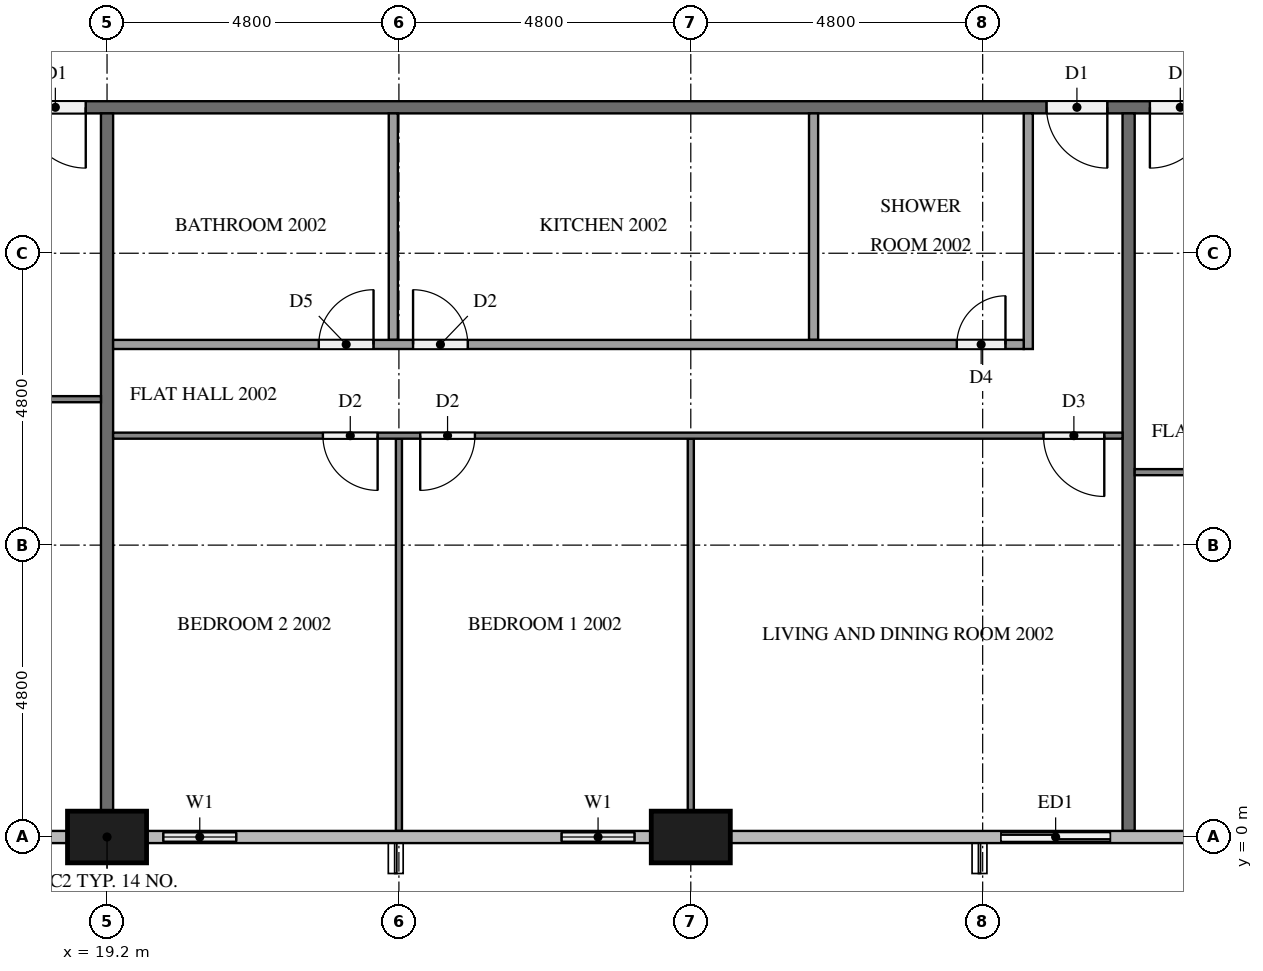
"""IFC4 building model, lengths in metres.
Left out: names, types, materials, properties, quantities, classifications, styles, units other than length and angle.
Written with IfcOpenShell. Run it as: python <this file> out.ifc"""

import sys

from ifc_helpers import new_model, si_unit, direction, frame, frame_2d, origin, origin_2d, place, context, subcontext, project, spatial, rectangle, extrude, element, fill, save


model = new_model("IFC4")
c1 = context("Model", 3, precision=1e-05, world=origin(), true_north=direction((0.0, 1.0)))
c2 = subcontext(c1, "Body", "Model", "MODEL_VIEW")
j1 = project(units=[si_unit("LENGTHUNIT", "METRE"), si_unit("PLANEANGLEUNIT", "RADIAN")], contexts=[c1])
p1 = place(None, origin())
s1 = spatial("IfcSite", under=j1, at=p1, CompositionType="ELEMENT")
p2 = place(p1, origin())
s2 = spatial("IfcBuilding", under=s1, at=p2, CompositionType="ELEMENT")
p3 = place(p2, frame((0.0, 0.0, 80.3)))
s3 = spatial("IfcBuildingStorey", under=s2, at=p3, CompositionType="ELEMENT", Elevation=80.3)
for number, where, z_axis, x_axis in (
    (1, (19.2, 0.0, 0.0), (0.0, 0.0, 1.0), (1.0, 0.0, 0.0)),
    (2, (28.8, 0.0, 0.0), (0.0, 0.0, 1.0), (1.0, 0.0, 0.0)),
):
    element("IfcColumn", number, at=place(p3, frame(where, z_axis=z_axis, x_axis=x_axis)), inside=s3, PredefinedType="COLUMN", context=c2, shape_type="SweptSolid", body=[
        extrude(rectangle(XDim=1.3, YDim=0.85, at=origin_2d()), origin(), (0.0, 0.0, 1.0), 3.1),
    ])
p4 = place(p3, frame((16.8, 0.0, 0.0), z_axis=(0.0, 0.0, 1.0), x_axis=(1.0, 0.0, 0.0)))
e3 = element("IfcWall", 3, at=p4, inside=s3, PredefinedType="SOLIDWALL", context=c2, shape_type="SweptSolid", body=[
    extrude(rectangle(XDim=1.75, YDim=0.15, at=frame_2d((0.875, 0.0))), origin(), (0.0, 0.0, 1.0), 3.1),
])
p5 = place(p4, frame((0.275, 0.0, 0.9)))
e4 = element("IfcOpeningElement", 4, at=p5, cuts=e3, PredefinedType="OPENING", context=c2, shape_type="SweptSolid", body=[
    extrude(rectangle(XDim=1.2, YDim=1.4, at=frame_2d((0.6, 0.7))), frame((0.0, 0.085, 0.0), z_axis=(0.0, -1.0, 0.0), x_axis=(1.0, 0.0, 0.0)), (0.0, 0.0, 1.0), 0.17),
])
p6 = place(p3, frame((19.85, 0.0, 0.0), z_axis=(0.0, 0.0, 1.0), x_axis=(1.0, 0.0, 0.0)))
e5 = element("IfcWall", 5, at=p6, inside=s3, PredefinedType="SOLIDWALL", context=c2, shape_type="SweptSolid", body=[
    extrude(rectangle(XDim=1.75, YDim=0.15, at=frame_2d((0.875, 0.0))), origin(), (0.0, 0.0, 1.0), 3.1),
])
p7 = place(p6, frame((0.275, 0.0, 0.9)))
e6 = element("IfcOpeningElement", 6, at=p7, cuts=e5, PredefinedType="OPENING", context=c2, shape_type="SweptSolid", body=[
    extrude(rectangle(XDim=1.2, YDim=1.4, at=frame_2d((0.6, 0.7))), frame((0.0, 0.085, 0.0), z_axis=(0.0, -1.0, 0.0), x_axis=(1.0, 0.0, 0.0)), (0.0, 0.0, 1.0), 0.17),
])
p8 = place(p3, frame((26.4, 0.0, 0.0), z_axis=(0.0, 0.0, 1.0), x_axis=(1.0, 0.0, 0.0)))
e7 = element("IfcWall", 7, at=p8, inside=s3, PredefinedType="SOLIDWALL", context=c2, shape_type="SweptSolid", body=[
    extrude(rectangle(XDim=1.75, YDim=0.15, at=frame_2d((0.875, 0.0))), origin(), (0.0, 0.0, 1.0), 3.1),
])
p9 = place(p8, frame((0.275, 0.0, 0.9)))
e8 = element("IfcOpeningElement", 8, at=p9, cuts=e7, PredefinedType="OPENING", context=c2, shape_type="SweptSolid", body=[
    extrude(rectangle(XDim=1.2, YDim=1.4, at=frame_2d((0.6, 0.7))), frame((0.0, 0.085, 0.0), z_axis=(0.0, -1.0, 0.0), x_axis=(1.0, 0.0, 0.0)), (0.0, 0.0, 1.0), 0.17),
])
p10 = place(p3, frame((33.6, 0.0, 0.0), z_axis=(0.0, 0.0, 1.0), x_axis=(1.0, 0.0, 0.0)))
e9 = element("IfcWall", 9, at=p10, inside=s3, PredefinedType="SOLIDWALL", context=c2, shape_type="SweptSolid", body=[
    extrude(rectangle(XDim=2.4, YDim=0.15, at=frame_2d((1.2, 0.0))), origin(), (0.0, 0.0, 1.0), 3.1),
])
p11 = place(p10, frame((0.3, 0.0, 0.0)))
e10 = element("IfcOpeningElement", 10, at=p11, cuts=e9, PredefinedType="OPENING", context=c2, shape_type="SweptSolid", body=[
    extrude(rectangle(XDim=1.8, YDim=2.4, at=frame_2d((0.9, 1.2))), frame((0.0, 0.085, 0.0), z_axis=(0.0, -1.0, 0.0), x_axis=(1.0, 0.0, 0.0)), (0.0, 0.0, 1.0), 0.17),
])
p12 = place(p3, frame((50.5, 12.0, 0.0), z_axis=(0.0, 0.0, 1.0), x_axis=(-1.0, 0.0, 0.0)))
e11 = element("IfcWall", 11, at=p12, inside=s3, PredefinedType="PARTITIONING", context=c2, shape_type="SweptSolid", body=[
    extrude(rectangle(XDim=38.6, YDim=0.2, at=frame_2d((19.3, 0.0))), origin(), (0.0, 0.0, 1.0), 3.1),
])
p13 = place(p12, frame((31.65, 0.0, 0.0)))
e12 = element("IfcOpeningElement", 12, at=p13, cuts=e11, PredefinedType="OPENING", context=c2, shape_type="SweptSolid", body=[
    extrude(rectangle(XDim=1.0, YDim=2.1, at=frame_2d((0.5, 1.05))), frame((0.0, 0.11, 0.0), z_axis=(0.0, -1.0, 0.0), x_axis=(1.0, 0.0, 0.0)), (0.0, 0.0, 1.0), 0.22),
])
p14 = place(p12, frame((14.85, 0.0, 0.0)))
e13 = element("IfcOpeningElement", 13, at=p14, cuts=e11, PredefinedType="OPENING", context=c2, shape_type="SweptSolid", body=[
    extrude(rectangle(XDim=1.0, YDim=2.1, at=frame_2d((0.5, 1.05))), frame((0.0, 0.11, 0.0), z_axis=(0.0, -1.0, 0.0), x_axis=(1.0, 0.0, 0.0)), (0.0, 0.0, 1.0), 0.22),
])
p15 = place(p12, frame((13.15, 0.0, 0.0)))
e14 = element("IfcOpeningElement", 14, at=p15, cuts=e11, PredefinedType="OPENING", context=c2, shape_type="SweptSolid", body=[
    extrude(rectangle(XDim=1.0, YDim=2.1, at=frame_2d((0.5, 1.05))), frame((0.0, 0.11, 0.0), z_axis=(0.0, -1.0, 0.0), x_axis=(1.0, 0.0, 0.0)), (0.0, 0.0, 1.0), 0.22),
])
p16 = place(p3, frame((19.2, 11.9, 0.0), z_axis=(0.0, 0.0, 1.0), x_axis=(0.0, -1.0, 0.0)))
e15 = element("IfcWall", 15, at=p16, inside=s3, PredefinedType="PARTITIONING", context=c2, shape_type="SweptSolid", body=[
    extrude(rectangle(XDim=11.475, YDim=0.2, at=frame_2d((5.737, 0.0))), origin(), (0.0, 0.0, 1.0), 3.1),
])
p17 = place(p3, frame((36.0, 11.9, 0.0), z_axis=(0.0, 0.0, 1.0), x_axis=(0.0, -1.0, 0.0)))
e16 = element("IfcWall", 16, at=p17, inside=s3, PredefinedType="PARTITIONING", context=c2, shape_type="SweptSolid", body=[
    extrude(rectangle(XDim=11.8, YDim=0.2, at=frame_2d((5.9, 0.0))), origin(), (0.0, 0.0, 1.0), 3.1),
])
p18 = place(p3, frame((19.1, 7.2, 0.0), z_axis=(0.0, 0.0, 1.0), x_axis=(-1.0, 0.0, 0.0)))
e17 = element("IfcWall", 17, at=p18, inside=s3, PredefinedType="PARTITIONING", context=c2, shape_type="SweptSolid", body=[
    extrude(rectangle(XDim=14.2, YDim=0.1, at=frame_2d((7.1, 0.0))), origin(), (0.0, 0.0, 1.0), 3.1),
])
p19 = place(p18, frame((3.45, 0.0, 0.0)))
e18 = element("IfcOpeningElement", 18, at=p19, cuts=e17, PredefinedType="OPENING", context=c2, shape_type="SweptSolid", body=[
    extrude(rectangle(XDim=0.9, YDim=2.1, at=frame_2d((0.45, 1.05))), frame((0.0, 0.06, 0.0), z_axis=(0.0, -1.0, 0.0), x_axis=(1.0, 0.0, 0.0)), (0.0, 0.0, 1.0), 0.12),
])
p20 = place(p18, frame((5.05, 0.0, 0.0)))
e19 = element("IfcOpeningElement", 19, at=p20, cuts=e17, PredefinedType="OPENING", context=c2, shape_type="SweptSolid", body=[
    extrude(rectangle(XDim=0.9, YDim=2.1, at=frame_2d((0.45, 1.05))), frame((0.0, 0.06, 0.0), z_axis=(0.0, -1.0, 0.0), x_axis=(1.0, 0.0, 0.0)), (0.0, 0.0, 1.0), 0.12),
])
p21 = place(p18, frame((12.9, 0.0, 0.0)))
e20 = element("IfcOpeningElement", 20, at=p21, cuts=e17, PredefinedType="OPENING", context=c2, shape_type="SweptSolid", body=[
    extrude(rectangle(XDim=1.0, YDim=2.1, at=frame_2d((0.5, 1.05))), frame((0.0, 0.06, 0.0), z_axis=(0.0, -1.0, 0.0), x_axis=(1.0, 0.0, 0.0)), (0.0, 0.0, 1.0), 0.12),
])
p22 = place(p3, frame((28.8, 6.55, 0.0), z_axis=(0.0, 0.0, 1.0), x_axis=(0.0, -1.0, 0.0)))
e21 = element("IfcWall", 21, at=p22, inside=s3, PredefinedType="PARTITIONING", context=c2, shape_type="SweptSolid", body=[
    extrude(rectangle(XDim=6.125, YDim=0.1, at=frame_2d((3.062, 0.0))), origin(), (0.0, 0.0, 1.0), 3.1),
])
p23 = place(p3, frame((24.0, 6.55, 0.0), z_axis=(0.0, 0.0, 1.0), x_axis=(0.0, -1.0, 0.0)))
e22 = element("IfcWall", 22, at=p23, inside=s3, PredefinedType="PARTITIONING", context=c2, shape_type="SweptSolid", body=[
    extrude(rectangle(XDim=6.45, YDim=0.1, at=frame_2d((3.225, 0.0))), origin(), (0.0, 0.0, 1.0), 3.1),
])
p24 = place(p3, frame((35.9, 6.6, 0.0), z_axis=(0.0, 0.0, 1.0), x_axis=(-1.0, 0.0, 0.0)))
e23 = element("IfcWall", 23, at=p24, inside=s3, PredefinedType="PARTITIONING", context=c2, shape_type="SweptSolid", body=[
    extrude(rectangle(XDim=16.6, YDim=0.1, at=frame_2d((8.3, 0.0))), origin(), (0.0, 0.0, 1.0), 3.1),
])
p25 = place(p24, frame((0.3, 0.0, 0.0)))
e24 = element("IfcOpeningElement", 24, at=p25, cuts=e23, PredefinedType="OPENING", context=c2, shape_type="SweptSolid", body=[
    extrude(rectangle(XDim=1.0, YDim=2.1, at=frame_2d((0.5, 1.05))), frame((0.0, 0.06, 0.0), z_axis=(0.0, -1.0, 0.0), x_axis=(1.0, 0.0, 0.0)), (0.0, 0.0, 1.0), 0.12),
])
p26 = place(p24, frame((10.65, 0.0, 0.0)))
e25 = element("IfcOpeningElement", 25, at=p26, cuts=e23, PredefinedType="OPENING", context=c2, shape_type="SweptSolid", body=[
    extrude(rectangle(XDim=0.9, YDim=2.1, at=frame_2d((0.45, 1.05))), frame((0.0, 0.06, 0.0), z_axis=(0.0, -1.0, 0.0), x_axis=(1.0, 0.0, 0.0)), (0.0, 0.0, 1.0), 0.12),
])
p27 = place(p24, frame((12.25, 0.0, 0.0)))
e26 = element("IfcOpeningElement", 26, at=p27, cuts=e23, PredefinedType="OPENING", context=c2, shape_type="SweptSolid", body=[
    extrude(rectangle(XDim=0.9, YDim=2.1, at=frame_2d((0.45, 1.05))), frame((0.0, 0.06, 0.0), z_axis=(0.0, -1.0, 0.0), x_axis=(1.0, 0.0, 0.0)), (0.0, 0.0, 1.0), 0.12),
])
for number, where, z_axis, x_axis in (
    (27, (30.819, 11.9, 0.0), (0.0, 0.0, 1.0), (0.0, -1.0, 0.0)),
    (28, (23.908, 11.9, 0.0), (0.0, 0.0, 1.0), (0.0, -1.0, 0.0)),
):
    element("IfcWall", number, at=place(p3, frame(where, z_axis=z_axis, x_axis=x_axis)), inside=s3, PredefinedType="PARTITIONING", context=c2, shape_type="SweptSolid", body=[
        extrude(rectangle(XDim=3.725, YDim=0.15, at=frame_2d((1.862, 0.0))), origin(), (0.0, 0.0, 1.0), 3.1),
    ])
p28 = place(p3, frame((34.35, 11.9, 0.0), z_axis=(0.0, 0.0, 1.0), x_axis=(0.0, -1.0, 0.0)))
e29 = element("IfcWall", 29, at=p28, inside=s3, PredefinedType="PARTITIONING", context=c2, shape_type="SweptSolid", body=[
    extrude(rectangle(XDim=3.875, YDim=0.15, at=frame_2d((1.938, 0.0))), origin(), (0.0, 0.0, 1.0), 3.1),
])
p29 = place(p3, frame((19.3, 8.1, 0.0), z_axis=(0.0, 0.0, 1.0), x_axis=(1.0, 0.0, 0.0)))
e30 = element("IfcWall", 30, at=p29, inside=s3, PredefinedType="PARTITIONING", context=c2, shape_type="SweptSolid", body=[
    extrude(rectangle(XDim=14.975, YDim=0.15, at=frame_2d((7.487, 0.0))), origin(), (0.0, 0.0, 1.0), 3.1),
])
p30 = place(p29, frame((13.875, 0.0, 0.0)))
e31 = element("IfcOpeningElement", 31, at=p30, cuts=e30, PredefinedType="OPENING", context=c2, shape_type="SweptSolid", body=[
    extrude(rectangle(XDim=0.8, YDim=2.1, at=frame_2d((0.4, 1.05))), frame((0.0, 0.085, 0.0), z_axis=(0.0, -1.0, 0.0), x_axis=(1.0, 0.0, 0.0)), (0.0, 0.0, 1.0), 0.17),
])
p31 = place(p29, frame((4.933, 0.0, 0.0)))
e32 = element("IfcOpeningElement", 32, at=p31, cuts=e30, PredefinedType="OPENING", context=c2, shape_type="SweptSolid", body=[
    extrude(rectangle(XDim=0.9, YDim=2.1, at=frame_2d((0.45, 1.05))), frame((0.0, 0.085, 0.0), z_axis=(0.0, -1.0, 0.0), x_axis=(1.0, 0.0, 0.0)), (0.0, 0.0, 1.0), 0.17),
])
p32 = place(p29, frame((3.383, 0.0, 0.0)))
e33 = element("IfcOpeningElement", 33, at=p32, cuts=e30, PredefinedType="OPENING", context=c2, shape_type="SweptSolid", body=[
    extrude(rectangle(XDim=0.9, YDim=2.1, at=frame_2d((0.45, 1.05))), frame((0.0, 0.085, 0.0), z_axis=(0.0, -1.0, 0.0), x_axis=(1.0, 0.0, 0.0)), (0.0, 0.0, 1.0), 0.17),
])
p33 = place(p3, frame((50.3, 6.0, 0.0), z_axis=(0.0, 0.0, 1.0), x_axis=(-1.0, 0.0, 0.0)))
e34 = element("IfcWall", 34, at=p33, inside=s3, PredefinedType="PARTITIONING", context=c2, shape_type="SweptSolid", body=[
    extrude(rectangle(XDim=14.2, YDim=0.1, at=frame_2d((7.1, 0.0))), origin(), (0.0, 0.0, 1.0), 3.1),
])
p34 = place(p33, frame((9.85, 0.0, 0.0)))
e35 = element("IfcOpeningElement", 35, at=p34, cuts=e34, PredefinedType="OPENING", context=c2, shape_type="SweptSolid", body=[
    extrude(rectangle(XDim=1.0, YDim=2.1, at=frame_2d((0.5, 1.05))), frame((0.0, 0.06, 0.0), z_axis=(0.0, -1.0, 0.0), x_axis=(1.0, 0.0, 0.0)), (0.0, 0.0, 1.0), 0.12),
])
p35 = place(p33, frame((8.25, 0.0, 0.0)))
e36 = element("IfcOpeningElement", 36, at=p35, cuts=e34, PredefinedType="OPENING", context=c2, shape_type="SweptSolid", body=[
    extrude(rectangle(XDim=0.9, YDim=2.1, at=frame_2d((0.45, 1.05))), frame((0.0, 0.06, 0.0), z_axis=(0.0, -1.0, 0.0), x_axis=(1.0, 0.0, 0.0)), (0.0, 0.0, 1.0), 0.12),
])
p36 = place(p33, frame((0.3, 0.0, 0.0)))
e37 = element("IfcOpeningElement", 37, at=p36, cuts=e34, PredefinedType="OPENING", context=c2, shape_type="SweptSolid", body=[
    extrude(rectangle(XDim=0.9, YDim=2.1, at=frame_2d((0.45, 1.05))), frame((0.0, 0.06, 0.0), z_axis=(0.0, -1.0, 0.0), x_axis=(1.0, 0.0, 0.0)), (0.0, 0.0, 1.0), 0.12),
])
p37 = place(p7, origin())
e38 = element("IfcWindow", 38, at=p37, inside=s3, PartitioningType="SINGLE_PANEL", PredefinedType="WINDOW", context=c2, shape_type="SweptSolid", body=[
    extrude(rectangle(XDim=1.2, YDim=1.4, at=frame_2d((0.6, 0.7))), frame((0.0, 0.03, 0.0), z_axis=(0.0, -1.0, 0.0), x_axis=(1.0, 0.0, 0.0)), (0.0, 0.0, 1.0), 0.06),
])
fill(e6, e38)
p38 = place(p9, origin())
e39 = element("IfcWindow", 39, at=p38, inside=s3, PartitioningType="SINGLE_PANEL", PredefinedType="WINDOW", context=c2, shape_type="SweptSolid", body=[
    extrude(rectangle(XDim=1.2, YDim=1.4, at=frame_2d((0.6, 0.7))), frame((0.0, 0.03, 0.0), z_axis=(0.0, -1.0, 0.0), x_axis=(1.0, 0.0, 0.0)), (0.0, 0.0, 1.0), 0.06),
])
fill(e8, e39)
p39 = place(p11, origin())
e40 = element("IfcDoor", 40, at=p39, inside=s3, OperationType="SLIDING_TO_LEFT", PredefinedType="DOOR", context=c2, shape_type="SweptSolid", body=[
    extrude(rectangle(XDim=1.8, YDim=2.4, at=frame_2d((0.9, 1.2))), frame((0.0, 0.025, 0.0), z_axis=(0.0, -1.0, 0.0), x_axis=(1.0, 0.0, 0.0)), (0.0, 0.0, 1.0), 0.05),
])
fill(e10, e40)
p40 = place(p13, origin())
e41 = element("IfcDoor", 41, at=p40, inside=s3, OperationType="SINGLE_SWING_LEFT", PredefinedType="DOOR", context=c2, shape_type="SweptSolid", body=[
    extrude(rectangle(XDim=1.0, YDim=2.1, at=frame_2d((0.5, 1.05))), frame((0.0, 0.025, 0.0), z_axis=(0.0, -1.0, 0.0), x_axis=(1.0, 0.0, 0.0)), (0.0, 0.0, 1.0), 0.05),
])
fill(e12, e41)
p41 = place(p14, origin())
e42 = element("IfcDoor", 42, at=p41, inside=s3, OperationType="SINGLE_SWING_LEFT", PredefinedType="DOOR", context=c2, shape_type="SweptSolid", body=[
    extrude(rectangle(XDim=1.0, YDim=2.1, at=frame_2d((0.5, 1.05))), frame((0.0, 0.025, 0.0), z_axis=(0.0, -1.0, 0.0), x_axis=(1.0, 0.0, 0.0)), (0.0, 0.0, 1.0), 0.05),
])
fill(e13, e42)
p42 = place(p15, origin())
e43 = element("IfcDoor", 43, at=p42, inside=s3, OperationType="SINGLE_SWING_RIGHT", PredefinedType="DOOR", context=c2, shape_type="SweptSolid", body=[
    extrude(rectangle(XDim=1.0, YDim=2.1, at=frame_2d((0.5, 1.05))), frame((0.0, 0.025, 0.0), z_axis=(0.0, -1.0, 0.0), x_axis=(1.0, 0.0, 0.0)), (0.0, 0.0, 1.0), 0.05),
])
fill(e14, e43)
p43 = place(p25, origin())
e44 = element("IfcDoor", 44, at=p43, inside=s3, OperationType="SINGLE_SWING_LEFT", PredefinedType="DOOR", context=c2, shape_type="SweptSolid", body=[
    extrude(rectangle(XDim=1.0, YDim=2.1, at=frame_2d((0.5, 1.05))), frame((0.0, 0.025, 0.0), z_axis=(0.0, -1.0, 0.0), x_axis=(1.0, 0.0, 0.0)), (0.0, 0.0, 1.0), 0.05),
])
fill(e24, e44)
p44 = place(p26, origin())
e45 = element("IfcDoor", 45, at=p44, inside=s3, OperationType="SINGLE_SWING_RIGHT", PredefinedType="DOOR", context=c2, shape_type="SweptSolid", body=[
    extrude(rectangle(XDim=0.9, YDim=2.1, at=frame_2d((0.45, 1.05))), frame((0.0, 0.025, 0.0), z_axis=(0.0, -1.0, 0.0), x_axis=(1.0, 0.0, 0.0)), (0.0, 0.0, 1.0), 0.05),
])
fill(e25, e45)
p45 = place(p27, origin())
e46 = element("IfcDoor", 46, at=p45, inside=s3, OperationType="SINGLE_SWING_LEFT", PredefinedType="DOOR", context=c2, shape_type="SweptSolid", body=[
    extrude(rectangle(XDim=0.9, YDim=2.1, at=frame_2d((0.45, 1.05))), frame((0.0, 0.025, 0.0), z_axis=(0.0, -1.0, 0.0), x_axis=(1.0, 0.0, 0.0)), (0.0, 0.0, 1.0), 0.05),
])
fill(e26, e46)
p46 = place(p30, origin())
e47 = element("IfcDoor", 47, at=p46, inside=s3, OperationType="SINGLE_SWING_RIGHT", PredefinedType="DOOR", context=c2, shape_type="SweptSolid", body=[
    extrude(rectangle(XDim=0.8, YDim=2.1, at=frame_2d((0.4, 1.05))), frame((0.0, 0.025, 0.0), z_axis=(0.0, -1.0, 0.0), x_axis=(1.0, 0.0, 0.0)), (0.0, 0.0, 1.0), 0.05),
])
fill(e31, e47)
p47 = place(p31, origin())
e48 = element("IfcDoor", 48, at=p47, inside=s3, OperationType="SINGLE_SWING_LEFT", PredefinedType="DOOR", context=c2, shape_type="SweptSolid", body=[
    extrude(rectangle(XDim=0.9, YDim=2.1, at=frame_2d((0.45, 1.05))), frame((0.0, 0.025, 0.0), z_axis=(0.0, -1.0, 0.0), x_axis=(1.0, 0.0, 0.0)), (0.0, 0.0, 1.0), 0.05),
])
fill(e32, e48)
p48 = place(p32, origin())
e49 = element("IfcDoor", 49, at=p48, inside=s3, OperationType="SINGLE_SWING_RIGHT", PredefinedType="DOOR", context=c2, shape_type="SweptSolid", body=[
    extrude(rectangle(XDim=0.9, YDim=2.1, at=frame_2d((0.45, 1.05))), frame((0.0, 0.025, 0.0), z_axis=(0.0, -1.0, 0.0), x_axis=(1.0, 0.0, 0.0)), (0.0, 0.0, 1.0), 0.05),
])
fill(e33, e49)
save(model, sys.argv[1])
